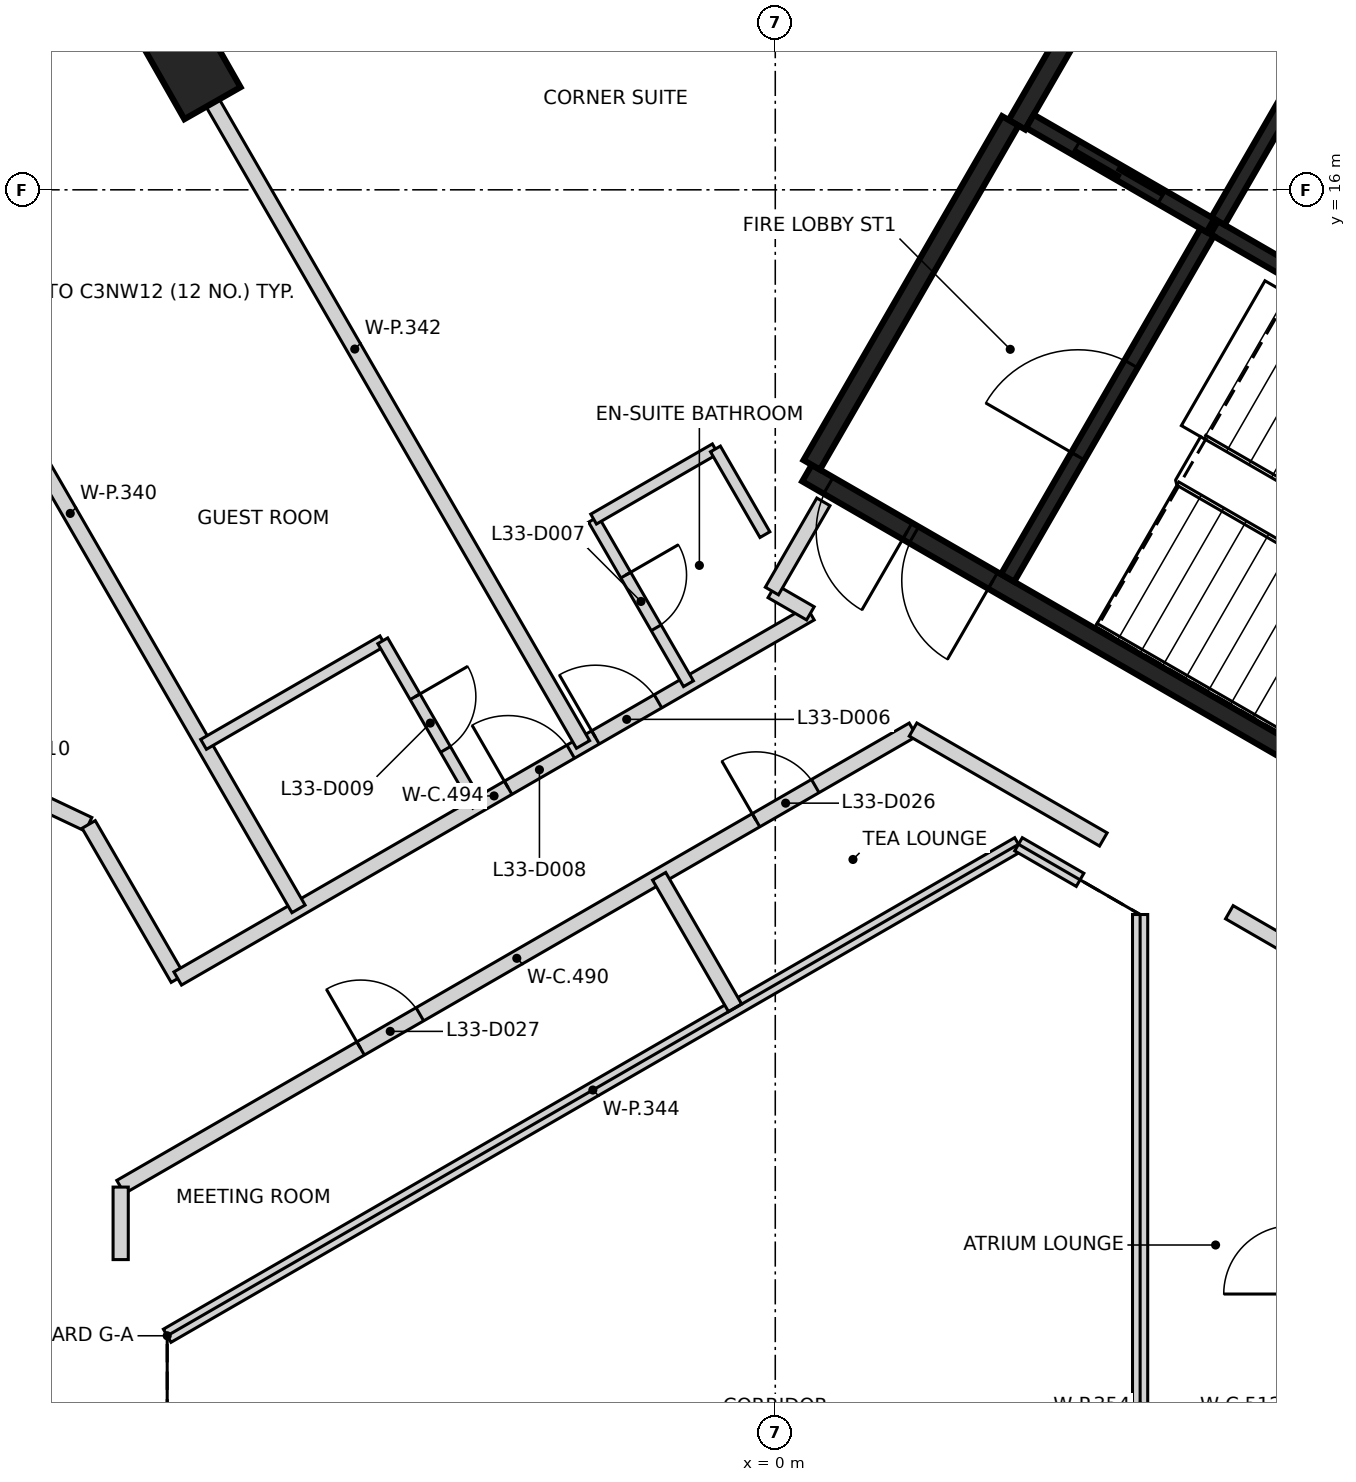
"""IFC4 building model, lengths in metres.
Left out: names, types, materials, properties, quantities, classifications, styles, units other than length and angle.
Written with IfcOpenShell. Run it as: python <this file> out.ifc"""

import sys

from ifc_helpers import new_model, si_unit, direction, frame, frame_2d, origin, origin_2d, place, context, subcontext, project, spatial, rectangle, extrude, element, fill, save


model = new_model("IFC4")
c1 = context("Model", 3, precision=1e-05, world=origin(), true_north=direction((0.0, 1.0)))
c2 = subcontext(c1, "Body", "Model", "MODEL_VIEW")
j1 = project(units=[si_unit("LENGTHUNIT", "METRE"), si_unit("PLANEANGLEUNIT", "RADIAN")], contexts=[c1])
p1 = place(None, origin())
s1 = spatial("IfcSite", under=j1, at=p1, CompositionType="ELEMENT")
p2 = place(p1, origin())
s2 = spatial("IfcBuilding", under=s1, at=p2, CompositionType="ELEMENT")
p3 = place(p2, frame((0.0, 0.0, 136.0)))
s3 = spatial("IfcBuildingStorey", under=s2, at=p3, CompositionType="ELEMENT", Elevation=136.0)
p4 = place(p3, frame((-7.714, 17.683, -0.4), z_axis=(0.0, 0.0, 1.0), x_axis=(-0.494656467983, 0.869088590813, 0.0)))
e1 = element("IfcColumn", 1, at=p4, inside=s3, PredefinedType="COLUMN", context=c2, shape_type="SweptSolid", body=[
    extrude(rectangle(XDim=1.25, YDim=0.85, at=origin_2d()), origin(), (0.0, 0.0, 1.0), 3.6),
])
p5 = place(p3, frame((10.42, 6.498, 0.0), z_axis=(0.0, 0.0, 1.0), x_axis=(-0.866021906294, 0.500006057782, 0.0)))
e2 = element("IfcWall", 2, at=p5, inside=s3, PredefinedType="SHEAR", context=c2, shape_type="SweptSolid", body=[
    extrude(rectangle(XDim=11.55, YDim=0.25, at=frame_2d((5.775, 0.0))), origin(), (0.0, 0.0, 1.0), 3.2),
])
p6 = place(p5, frame((10.025, 0.0, 0.0)))
e3 = element("IfcOpeningElement", 3, at=p6, cuts=e2, PredefinedType="OPENING", context=c2, shape_type="SweptSolid", body=[
    extrude(rectangle(XDim=1.2, YDim=2.1, at=frame_2d((0.6, 1.05))), frame((0.0, 0.135, 0.0), z_axis=(0.0, -1.0, 0.0), x_axis=(1.0, 0.0, 0.0)), (0.0, 0.0, 1.0), 0.27),
])
p7 = place(p5, frame((8.725, 0.0, 0.0)))
e4 = element("IfcOpeningElement", 4, at=p7, cuts=e2, PredefinedType="OPENING", context=c2, shape_type="SweptSolid", body=[
    extrude(rectangle(XDim=1.2, YDim=2.1, at=frame_2d((0.6, 1.05))), frame((0.0, 0.135, 0.0), z_axis=(0.0, -1.0, 0.0), x_axis=(1.0, 0.0, 0.0)), (0.0, 0.0, 1.0), 0.27),
])
p8 = place(p3, frame((3.179, 16.856, 0.0), z_axis=(0.0, 0.0, 1.0), x_axis=(0.500004234368, 0.866022959057, 0.0)))
e5 = element("IfcWall", 5, at=p8, inside=s3, PredefinedType="SHEAR", context=c2, shape_type="SweptSolid", body=[
    extrude(rectangle(XDim=6.25, YDim=0.25, at=frame_2d((3.125, 0.0))), origin(), (0.0, 0.0, 1.0), 3.2),
])
p9 = place(p3, frame((0.48, 12.381, 0.0), z_axis=(0.0, 0.0, 1.0), x_axis=(0.49999885962, 0.866026062182, 0.0)))
e6 = element("IfcWall", 6, at=p9, inside=s3, PredefinedType="SHEAR", context=c2, shape_type="SweptSolid", body=[
    extrude(rectangle(XDim=5.225, YDim=0.25, at=frame_2d((2.612, 0.0))), origin(), (0.0, 0.0, 1.0), 3.2),
])
p10 = place(p3, frame((5.775, 15.502, 0.0), z_axis=(0.0, 0.0, 1.0), x_axis=(0.866020080793, -0.500009219579, 0.0)))
e7 = element("IfcWall", 7, at=p10, inside=s3, PredefinedType="SHEAR", context=c2, shape_type="SweptSolid", body=[
    extrude(rectangle(XDim=5.699, YDim=0.2, at=frame_2d((2.85, 0.0))), origin(), (0.0, 0.0, 1.0), 3.2),
])
p11 = place(p3, frame((3.057, 10.895, 0.0), z_axis=(0.0, 0.0, 1.0), x_axis=(0.499989418164, 0.866031513124, 0.0)))
e8 = element("IfcWall", 8, at=p11, inside=s3, PredefinedType="SHEAR", context=c2, shape_type="SweptSolid", body=[
    extrude(rectangle(XDim=5.251, YDim=0.2, at=frame_2d((2.625, 0.0))), origin(), (0.0, 0.0, 1.0), 3.2),
])
p12 = place(p11, frame((1.849, 0.0, 0.0)))
e9 = element("IfcOpeningElement", 9, at=p12, cuts=e8, PredefinedType="OPENING", context=c2, shape_type="SweptSolid", body=[
    extrude(rectangle(XDim=1.4, YDim=2.1, at=frame_2d((0.7, 1.05))), frame((0.0, 0.11, 0.0), z_axis=(0.0, -1.0, 0.0), x_axis=(1.0, 0.0, 0.0)), (0.0, 0.0, 1.0), 0.22),
])
p13 = place(p3, frame((7.199, 17.97, 0.0), z_axis=(0.0, 0.0, 1.0), x_axis=(-0.499968400327, -0.866043647095, 0.0)))
e10 = element("IfcWall", 10, at=p13, inside=s3, PredefinedType="SHEAR", context=c2, shape_type="SweptSolid", body=[
    extrude(rectangle(XDim=2.75, YDim=0.2, at=frame_2d((1.375, 0.0))), origin(), (0.0, 0.0, 1.0), 3.2),
])
p14 = place(p3, frame((5.725, 15.531, 0.0), z_axis=(0.0, 0.0, 1.0), x_axis=(-0.866037306777, 0.499979382845, 0.0)))
e11 = element("IfcWall", 11, at=p14, inside=s3, PredefinedType="SHEAR", context=c2, shape_type="SweptSolid", body=[
    extrude(rectangle(XDim=2.742, YDim=0.2, at=frame_2d((1.371, 0.0))), origin(), (0.0, 0.0, 1.0), 3.2),
])
p15 = place(p14, frame((0.743, 0.0, 0.0)))
e12 = element("IfcOpeningElement", 12, at=p15, cuts=e11, PredefinedType="OPENING", context=c2, shape_type="SweptSolid", body=[
    extrude(rectangle(XDim=1.3, YDim=2.1, at=frame_2d((0.65, 1.05))), frame((0.0, 0.11, 0.0), z_axis=(0.0, -1.0, 0.0), x_axis=(1.0, 0.0, 0.0)), (0.0, 0.0, 1.0), 0.22),
])
p16 = place(p3, frame((-10.141, 8.176, 0.0), z_axis=(0.0, 0.0, 1.0), x_axis=(0.903904169039, -0.427735026849, 0.0)))
e13 = element("IfcWall", 13, at=p16, inside=s3, PredefinedType="PARTITIONING", context=c2, shape_type="SweptSolid", body=[
    extrude(rectangle(XDim=1.225, YDim=0.2, at=frame_2d((0.612, 0.0))), origin(), (0.0, 0.0, 1.0), 3.2),
])
p17 = place(p3, frame((-9.033, 7.651, 0.0), z_axis=(0.0, 0.0, 1.0), x_axis=(0.500354010599, -0.865820919173, 0.0)))
e14 = element("IfcWall", 14, at=p17, inside=s3, PredefinedType="PARTITIONING", context=c2, shape_type="SweptSolid", body=[
    extrude(rectangle(XDim=2.342, YDim=0.2, at=frame_2d((1.171, 0.0))), origin(), (0.0, 0.0, 1.0), 3.2),
])
p18 = place(p3, frame((-8.613, 2.881, 0.0), z_axis=(0.0, 0.0, 1.0), x_axis=(0.866103179807, 0.499865263774, 0.0)))
e15 = element("IfcWall", 15, at=p18, inside=s3, PredefinedType="PARTITIONING", context=c2, shape_type="SweptSolid", body=[
    extrude(rectangle(XDim=12.036, YDim=0.2, at=frame_2d((6.018, 0.0))), origin(), (0.0, 0.0, 1.0), 3.2),
])
p19 = place(p18, frame((9.652, 0.0, 0.0)))
e16 = element("IfcOpeningElement", 16, at=p19, cuts=e15, PredefinedType="OPENING", context=c2, shape_type="SweptSolid", body=[
    extrude(rectangle(XDim=0.9, YDim=2.1, at=frame_2d((0.45, 1.05))), frame((0.0, 0.11, 0.0), z_axis=(0.0, -1.0, 0.0), x_axis=(1.0, 0.0, 0.0)), (0.0, 0.0, 1.0), 0.22),
])
p20 = place(p18, frame((3.646, 0.0, 0.0)))
e17 = element("IfcOpeningElement", 17, at=p20, cuts=e15, PredefinedType="OPENING", context=c2, shape_type="SweptSolid", body=[
    extrude(rectangle(XDim=0.9, YDim=2.1, at=frame_2d((0.45, 1.05))), frame((0.0, 0.11, 0.0), z_axis=(0.0, -1.0, 0.0), x_axis=(1.0, 0.0, 0.0)), (0.0, 0.0, 1.0), 0.22),
])
p21 = place(p3, frame((-8.612, 1.926, 0.0), z_axis=(0.0, 0.0, 1.0), x_axis=(0.0, 1.0, 0.0)))
e18 = element("IfcWall", 18, at=p21, inside=s3, PredefinedType="PARTITIONING", context=c2, shape_type="SweptSolid", body=[
    extrude(rectangle(XDim=0.954, YDim=0.2, at=frame_2d((0.477, 0.0))), origin(), (0.0, 0.0, 1.0), 3.2),
])
p22 = place(p3, frame((-7.862, 5.624, 0.0), z_axis=(0.0, 0.0, 1.0), x_axis=(0.866109024618, 0.499855136491, 0.0)))
e19 = element("IfcWall", 19, at=p22, inside=s3, PredefinedType="PARTITIONING", context=c2, shape_type="SweptSolid", body=[
    extrude(rectangle(XDim=9.61, YDim=0.2, at=frame_2d((4.805, 0.0))), origin(), (0.0, 0.0, 1.0), 3.2),
])
p23 = place(p22, frame((6.345, 0.0, 0.0)))
e20 = element("IfcOpeningElement", 20, at=p23, cuts=e19, PredefinedType="OPENING", context=c2, shape_type="SweptSolid", body=[
    extrude(rectangle(XDim=0.95, YDim=2.1, at=frame_2d((0.475, 1.05))), frame((0.0, 0.11, 0.0), z_axis=(0.0, -1.0, 0.0), x_axis=(1.0, 0.0, 0.0)), (0.0, 0.0, 1.0), 0.22),
])
p24 = place(p22, frame((5.02, 0.0, 0.0)))
e21 = element("IfcOpeningElement", 21, at=p24, cuts=e19, PredefinedType="OPENING", context=c2, shape_type="SweptSolid", body=[
    extrude(rectangle(XDim=0.95, YDim=2.1, at=frame_2d((0.475, 1.05))), frame((0.0, 0.11, 0.0), z_axis=(0.0, -1.0, 0.0), x_axis=(1.0, 0.0, 0.0)), (0.0, 0.0, 1.0), 0.22),
])
p25 = place(p3, frame((-0.045, 10.721, 0.0), z_axis=(0.0, 0.0, 1.0), x_axis=(0.865768710998, -0.500444341617, 0.0)))
e22 = element("IfcWall", 22, at=p25, inside=s3, PredefinedType="PARTITIONING", context=c2, shape_type="SweptSolid", body=[
    extrude(rectangle(XDim=0.585, YDim=0.2, at=frame_2d((0.293, 0.0))), origin(), (0.0, 0.0, 1.0), 3.2),
])
p26 = place(p3, frame((-0.044, 10.722, 0.0), z_axis=(0.0, 0.0, 1.0), x_axis=(0.500034408226, 0.866005537274, 0.0)))
e23 = element("IfcWall", 23, at=p26, inside=s3, PredefinedType="PARTITIONING", context=c2, shape_type="SweptSolid", body=[
    extrude(rectangle(XDim=1.355, YDim=0.2, at=frame_2d((0.677, 0.0))), origin(), (0.0, 0.0, 1.0), 3.2),
])
p27 = place(p3, frame((1.813, 8.899, 0.0), z_axis=(0.0, 0.0, 1.0), x_axis=(0.865957732194, -0.50011719232, 0.0)))
e24 = element("IfcWall", 24, at=p27, inside=s3, PredefinedType="PARTITIONING", context=c2, shape_type="SweptSolid", body=[
    extrude(rectangle(XDim=2.891, YDim=0.2, at=frame_2d((1.445, 0.0))), origin(), (0.0, 0.0, 1.0), 2.3),
])
p28 = place(p3, frame((5.974, 6.496, 0.0), z_axis=(0.0, 0.0, 1.0), x_axis=(0.865934055563, -0.500158186394, 0.0)))
e25 = element("IfcWall", 25, at=p28, inside=s3, PredefinedType="PARTITIONING", context=c2, shape_type="SweptSolid", body=[
    extrude(rectangle(XDim=0.954, YDim=0.2, at=frame_2d((0.477, 0.0))), origin(), (0.0, 0.0, 1.0), 3.2),
])
p29 = place(p3, frame((-12.279, 16.946, 0.0), z_axis=(0.0, 0.0, 1.0), x_axis=(0.499902454835, -0.866081714187, 0.0)))
e26 = element("IfcWall", 26, at=p29, inside=s3, PredefinedType="PARTITIONING", context=c2, shape_type="SweptSolid", body=[
    extrude(rectangle(XDim=12.015, YDim=0.2, at=frame_2d((6.008, 0.0))), origin(), (0.0, 0.0, 1.0), 3.2),
])
p30 = place(p3, frame((-8.535, 19.107, 0.0), z_axis=(0.0, 0.0, 1.0), x_axis=(0.499972843048, -0.86604108229, 0.0)))
e27 = element("IfcWall", 27, at=p30, inside=s3, PredefinedType="PARTITIONING", context=c2, shape_type="SweptSolid", body=[
    extrude(rectangle(XDim=12.013, YDim=0.2, at=frame_2d((6.007, 0.0))), origin(), (0.0, 0.0, 1.0), 3.2),
])
p31 = place(p3, frame((-8.0, 0.924, 0.0), z_axis=(0.0, 0.0, 1.0), x_axis=(0.86604129137, 0.499972480886, 0.0)))
e28 = element("IfcWall", 28, at=p31, inside=s3, PredefinedType="PARTITIONING", context=c2, shape_type="SweptSolid", body=[
    extrude(rectangle(XDim=12.932, YDim=0.2, at=frame_2d((6.466, 0.0))), origin(), (0.0, 0.0, 1.0), 2.3),
])
p32 = place(p3, frame((-1.528, 6.969, 0.0), z_axis=(0.0, 0.0, 1.0), x_axis=(0.500000846469, -0.866024915075, 0.0)))
e29 = element("IfcWall", 29, at=p32, inside=s3, PredefinedType="PARTITIONING", context=c2, shape_type="SweptSolid", body=[
    extrude(rectangle(XDim=1.999, YDim=0.2, at=frame_2d((1.0, 0.0))), origin(), (0.0, 0.0, 1.0), 3.2),
])
p33 = place(p3, frame((3.2, 7.39, 0.0), z_axis=(0.0, 0.0, 1.0), x_axis=(0.865985641702, -0.500068863623, 0.0)))
e30 = element("IfcWall", 30, at=p33, inside=s3, PredefinedType="PARTITIONING", context=c2, shape_type="SweptSolid", body=[
    extrude(rectangle(XDim=0.935, YDim=0.2, at=frame_2d((0.468, 0.0))), origin(), (0.0, 0.0, 1.0), 2.3),
])
p34 = place(p3, frame((4.8, -6.466, 0.0), z_axis=(0.0, 0.0, 1.0), x_axis=(0.0, 1.0, 0.0)))
e31 = element("IfcWall", 31, at=p34, inside=s3, PredefinedType="PARTITIONING", context=c2, shape_type="SweptSolid", body=[
    extrude(rectangle(XDim=12.932, YDim=0.2, at=frame_2d((6.466, 0.0))), origin(), (0.0, 0.0, 1.0), 2.3),
])
p35 = place(p3, frame((-7.522, 8.704, 0.0), z_axis=(0.0, 0.0, 1.0), x_axis=(0.865972067821, 0.500092369221, 0.0)))
e32 = element("IfcWall", 32, at=p35, inside=s3, PredefinedType="PARTITIONING", context=c2, shape_type="SweptSolid", body=[
    extrude(rectangle(XDim=2.723, YDim=0.15, at=frame_2d((1.362, 0.0))), origin(), (0.0, 0.0, 1.0), 3.2),
])
p36 = place(p3, frame((-5.164, 10.067, 0.0), z_axis=(0.0, 0.0, 1.0), x_axis=(0.500046524342, -0.865998541277, 0.0)))
e33 = element("IfcWall", 33, at=p36, inside=s3, PredefinedType="PARTITIONING", context=c2, shape_type="SweptSolid", body=[
    extrude(rectangle(XDim=2.5, YDim=0.15, at=frame_2d((1.25, 0.0))), origin(), (0.0, 0.0, 1.0), 3.2),
])
p37 = place(p36, frame((0.85, 0.0, 0.0)))
e34 = element("IfcOpeningElement", 34, at=p37, cuts=e33, PredefinedType="OPENING", context=c2, shape_type="SweptSolid", body=[
    extrude(rectangle(XDim=0.8, YDim=2.1, at=frame_2d((0.4, 1.05))), frame((0.0, 0.085, 0.0), z_axis=(0.0, -1.0, 0.0), x_axis=(1.0, 0.0, 0.0)), (0.0, 0.0, 1.0), 0.17),
])
p38 = place(p3, frame((-2.391, 11.665, 0.0), z_axis=(0.0, 0.0, 1.0), x_axis=(0.500049599607, -0.865996765544, 0.0)))
e35 = element("IfcWall", 35, at=p38, inside=s3, PredefinedType="PARTITIONING", context=c2, shape_type="SweptSolid", body=[
    extrude(rectangle(XDim=2.498, YDim=0.15, at=frame_2d((1.249, 0.0))), origin(), (0.0, 0.0, 1.0), 3.2),
])
p39 = place(p38, frame((0.848, 0.0, 0.0)))
e36 = element("IfcOpeningElement", 36, at=p39, cuts=e35, PredefinedType="OPENING", context=c2, shape_type="SweptSolid", body=[
    extrude(rectangle(XDim=0.8, YDim=2.1, at=frame_2d((0.4, 1.05))), frame((0.0, 0.085, 0.0), z_axis=(0.0, -1.0, 0.0), x_axis=(1.0, 0.0, 0.0)), (0.0, 0.0, 1.0), 0.17),
])
p40 = place(p3, frame((-2.39, 11.668, 0.0), z_axis=(0.0, 0.0, 1.0), x_axis=(0.865932482239, 0.500160910312, 0.0)))
e37 = element("IfcWall", 37, at=p40, inside=s3, PredefinedType="PARTITIONING", context=c2, shape_type="SweptSolid", body=[
    extrude(rectangle(XDim=1.848, YDim=0.15, at=frame_2d((0.924, 0.0))), origin(), (0.0, 0.0, 1.0), 3.2),
])
p41 = place(p3, frame((-0.787, 12.591, 0.0), z_axis=(0.0, 0.0, 1.0), x_axis=(0.499749509877, -0.866169976031, 0.0)))
e38 = element("IfcWall", 38, at=p41, inside=s3, PredefinedType="PARTITIONING", context=c2, shape_type="SweptSolid", body=[
    extrude(rectangle(XDim=1.302, YDim=0.15, at=frame_2d((0.651, 0.0))), origin(), (0.0, 0.0, 1.0), 3.2),
])
p42 = place(p15, origin())
e39 = element("IfcDoor", 39, at=p42, inside=s3, OperationType="SLIDING_TO_LEFT", PredefinedType="DOOR", context=c2, shape_type="SweptSolid", body=[
    extrude(rectangle(XDim=1.3, YDim=2.1, at=frame_2d((0.65, 1.05))), frame((0.0, 0.025, 0.0), z_axis=(0.0, -1.0, 0.0), x_axis=(1.0, 0.0, 0.0)), (0.0, 0.0, 1.0), 0.05),
])
fill(e12, e39)
p43 = place(p6, origin())
e40 = element("IfcDoor", 40, at=p43, inside=s3, OperationType="SINGLE_SWING_LEFT", PredefinedType="DOOR", context=c2, shape_type="SweptSolid", body=[
    extrude(rectangle(XDim=1.2, YDim=2.1, at=frame_2d((0.6, 1.05))), frame((0.0, 0.025, 0.0), z_axis=(0.0, -1.0, 0.0), x_axis=(1.0, 0.0, 0.0)), (0.0, 0.0, 1.0), 0.05),
])
fill(e3, e40)
p44 = place(p7, origin())
e41 = element("IfcDoor", 41, at=p44, inside=s3, OperationType="SINGLE_SWING_RIGHT", PredefinedType="DOOR", context=c2, shape_type="SweptSolid", body=[
    extrude(rectangle(XDim=1.2, YDim=2.1, at=frame_2d((0.6, 1.05))), frame((0.0, 0.025, 0.0), z_axis=(0.0, -1.0, 0.0), x_axis=(1.0, 0.0, 0.0)), (0.0, 0.0, 1.0), 0.05),
])
fill(e4, e41)
p45 = place(p12, origin())
e42 = element("IfcDoor", 42, at=p45, inside=s3, OperationType="SINGLE_SWING_LEFT", PredefinedType="DOOR", context=c2, shape_type="SweptSolid", body=[
    extrude(rectangle(XDim=1.4, YDim=2.1, at=frame_2d((0.7, 1.05))), frame((0.0, 0.025, 0.0), z_axis=(0.0, -1.0, 0.0), x_axis=(1.0, 0.0, 0.0)), (0.0, 0.0, 1.0), 0.05),
])
fill(e9, e42)
p46 = place(p23, origin())
e43 = element("IfcDoor", 43, at=p46, inside=s3, OperationType="SINGLE_SWING_LEFT", PredefinedType="DOOR", context=c2, shape_type="SweptSolid", body=[
    extrude(rectangle(XDim=0.95, YDim=2.1, at=frame_2d((0.475, 1.05))), frame((0.0, 0.025, 0.0), z_axis=(0.0, -1.0, 0.0), x_axis=(1.0, 0.0, 0.0)), (0.0, 0.0, 1.0), 0.05),
])
fill(e20, e43)
p47 = place(p39, origin())
e44 = element("IfcDoor", 44, at=p47, inside=s3, OperationType="SINGLE_SWING_LEFT", PredefinedType="DOOR", context=c2, shape_type="SweptSolid", body=[
    extrude(rectangle(XDim=0.8, YDim=2.1, at=frame_2d((0.4, 1.05))), frame((0.0, 0.025, 0.0), z_axis=(0.0, -1.0, 0.0), x_axis=(1.0, 0.0, 0.0)), (0.0, 0.0, 1.0), 0.05),
])
fill(e36, e44)
p48 = place(p24, origin())
e45 = element("IfcDoor", 45, at=p48, inside=s3, OperationType="SINGLE_SWING_LEFT", PredefinedType="DOOR", context=c2, shape_type="SweptSolid", body=[
    extrude(rectangle(XDim=0.95, YDim=2.1, at=frame_2d((0.475, 1.05))), frame((0.0, 0.025, 0.0), z_axis=(0.0, -1.0, 0.0), x_axis=(1.0, 0.0, 0.0)), (0.0, 0.0, 1.0), 0.05),
])
fill(e21, e45)
p49 = place(p37, frame((0.8, 0.0, 0.0), z_axis=(0.0, 0.0, 1.0), x_axis=(-1.0, 0.0, 0.0)))
e46 = element("IfcDoor", 46, at=p49, inside=s3, OperationType="SINGLE_SWING_LEFT", PredefinedType="DOOR", context=c2, shape_type="SweptSolid", body=[
    extrude(rectangle(XDim=0.8, YDim=2.1, at=frame_2d((0.4, 1.05))), frame((0.0, 0.025, 0.0), z_axis=(0.0, -1.0, 0.0), x_axis=(1.0, 0.0, 0.0)), (0.0, 0.0, 1.0), 0.05),
])
fill(e34, e46)
p50 = place(p19, frame((0.9, 0.0, 0.0), z_axis=(0.0, 0.0, 1.0), x_axis=(-1.0, 0.0, 0.0)))
e47 = element("IfcDoor", 47, at=p50, inside=s3, OperationType="SINGLE_SWING_LEFT", PredefinedType="DOOR", context=c2, shape_type="SweptSolid", body=[
    extrude(rectangle(XDim=0.9, YDim=2.1, at=frame_2d((0.45, 1.05))), frame((0.0, 0.025, 0.0), z_axis=(0.0, -1.0, 0.0), x_axis=(1.0, 0.0, 0.0)), (0.0, 0.0, 1.0), 0.05),
])
fill(e16, e47)
p51 = place(p20, frame((0.9, 0.0, 0.0), z_axis=(0.0, 0.0, 1.0), x_axis=(-1.0, 0.0, 0.0)))
e48 = element("IfcDoor", 48, at=p51, inside=s3, OperationType="SINGLE_SWING_LEFT", PredefinedType="DOOR", context=c2, shape_type="SweptSolid", body=[
    extrude(rectangle(XDim=0.9, YDim=2.1, at=frame_2d((0.45, 1.05))), frame((0.0, 0.025, 0.0), z_axis=(0.0, -1.0, 0.0), x_axis=(1.0, 0.0, 0.0)), (0.0, 0.0, 1.0), 0.05),
])
fill(e17, e48)
save(model, sys.argv[1])
